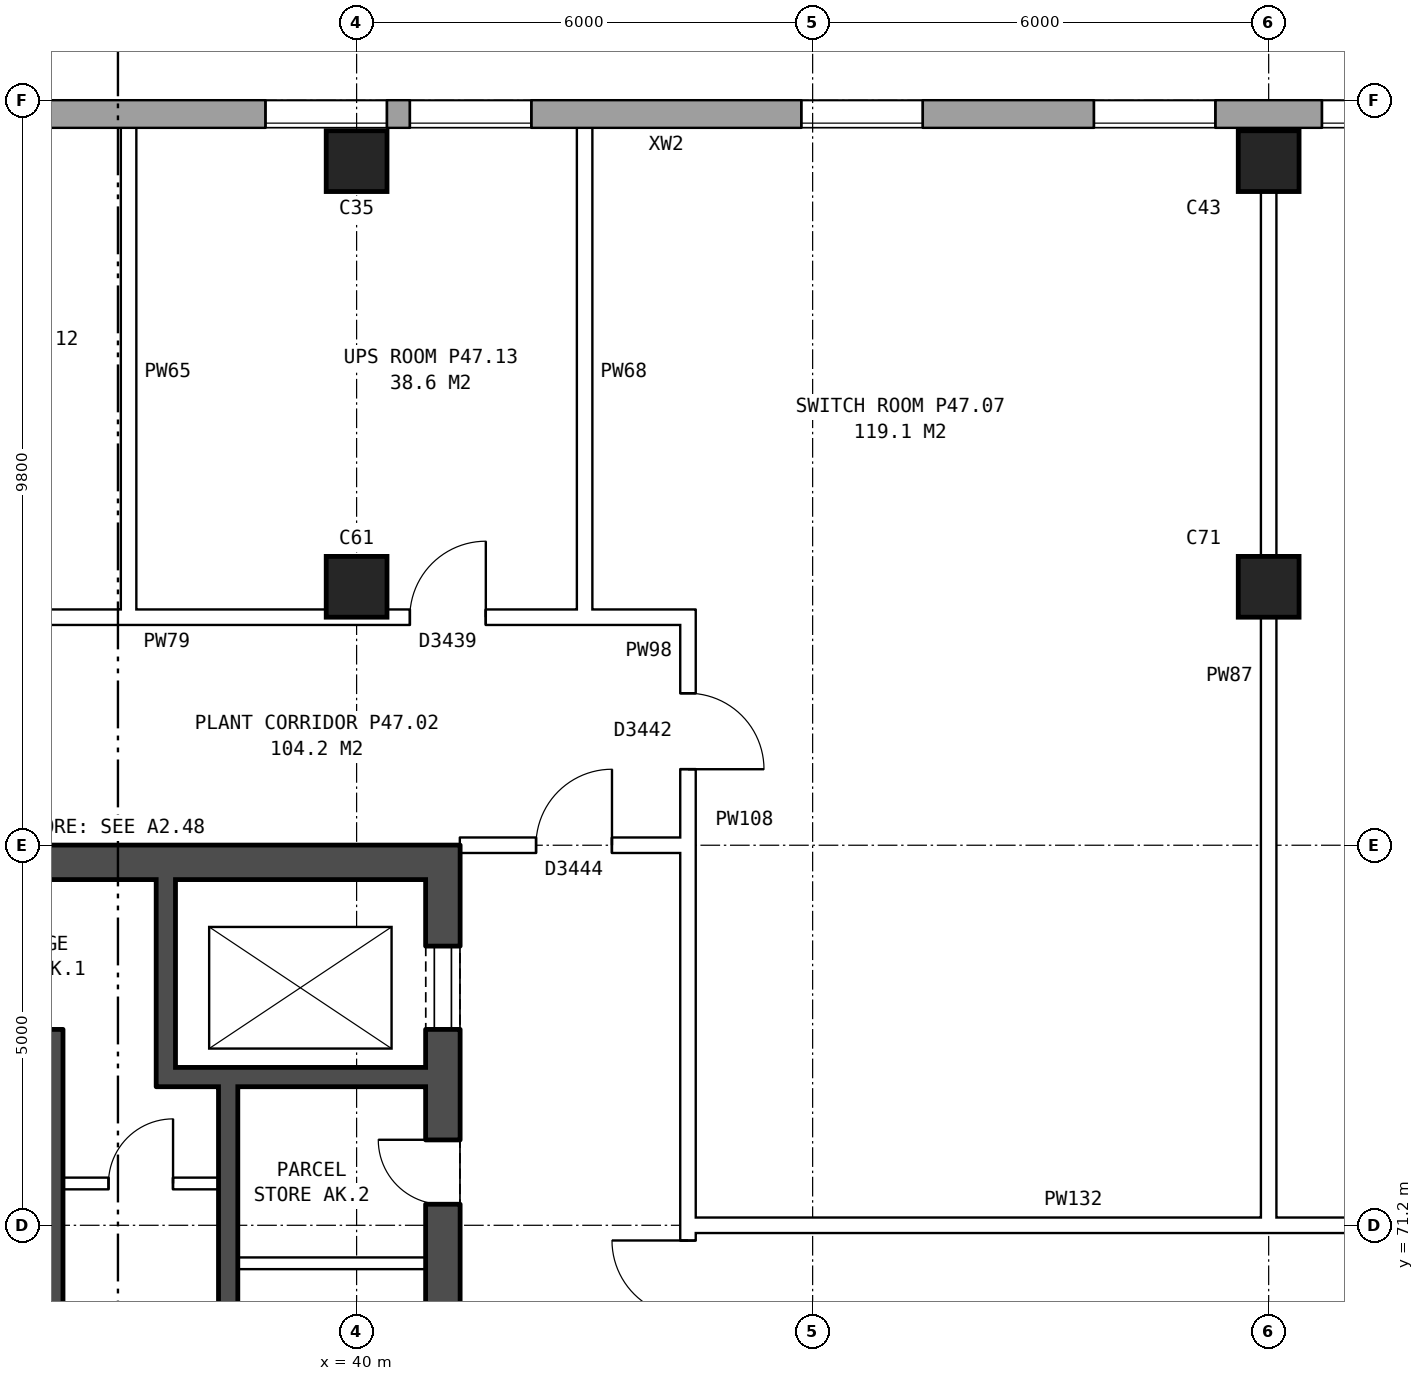
"""IFC4 building model, lengths in metres.
Left out: names, types, materials, properties, quantities, classifications, styles, units other than length and angle.
Written with IfcOpenShell. Run it as: python <this file> out.ifc"""

import sys

from ifc_helpers import new_model, si_unit, direction, frame, frame_2d, origin, origin_2d, place, context, subcontext, project, spatial, rectangle, extrude, element, fill, save


model = new_model("IFC4")
c1 = context("Model", 3, precision=1e-05, world=origin(), true_north=direction((0.0, 1.0)))
c2 = subcontext(c1, "Body", "Model", "MODEL_VIEW")
j1 = project(units=[si_unit("LENGTHUNIT", "METRE"), si_unit("PLANEANGLEUNIT", "RADIAN")], contexts=[c1])
p1 = place(None, origin())
s1 = spatial("IfcSite", under=j1, at=p1, CompositionType="ELEMENT")
p2 = place(p1, origin())
s2 = spatial("IfcBuilding", under=s1, at=p2, CompositionType="ELEMENT")
p3 = place(p2, frame((0.0, 0.0, 167.1)))
s3 = spatial("IfcBuildingStorey", under=s2, at=p3, CompositionType="ELEMENT", Elevation=167.1)
for number, where, z_axis, x_axis in (
    (1, (40.0, 79.6, 0.0), (0.0, 0.0, 1.0), (1.0, 0.0, 0.0)),
    (2, (40.0, 85.2, 0.0), (0.0, 0.0, 1.0), (1.0, 0.0, 0.0)),
    (3, (52.0, 79.6, 0.0), (0.0, 0.0, 1.0), (1.0, 0.0, 0.0)),
    (4, (52.0, 85.2, 0.0), (0.0, 0.0, 1.0), (1.0, 0.0, 0.0)),
):
    element("IfcColumn", number, at=place(p3, frame(where, z_axis=z_axis, x_axis=x_axis)), inside=s3, PredefinedType="COLUMN", context=c2, shape_type="SweptSolid", body=[
        extrude(rectangle(XDim=0.8, YDim=0.8, at=origin_2d()), origin(), (0.0, 0.0, 1.0), 4.2),
    ])
p4 = place(p3, frame((72.925, 85.82, 0.0), z_axis=(0.0, 0.0, 1.0), x_axis=(-1.0, 0.0, 0.0)))
e5 = element("IfcWall", 5, at=p4, inside=s3, PredefinedType="STANDARD", context=c2, shape_type="SweptSolid", body=[
    extrude(rectangle(XDim=39.601, YDim=0.36, at=frame_2d((19.8, 0.0))), origin(), (0.0, 0.0, 1.0), 4.2),
])
p5 = place(p4, frame((2.25, 0.0, 1.5)))
e6 = element("IfcOpeningElement", 6, at=p5, cuts=e5, PredefinedType="OPENING", context=c2, shape_type="SweptSolid", body=[
    extrude(rectangle(XDim=1.6, YDim=1.2, at=frame_2d((0.8, 0.6))), frame((0.0, 0.19, 0.0), z_axis=(0.0, -1.0, 0.0), x_axis=(1.0, 0.0, 0.0)), (0.0, 0.0, 1.0), 0.38),
])
p6 = place(p4, frame((6.625, 0.0, 1.5)))
e7 = element("IfcOpeningElement", 7, at=p6, cuts=e5, PredefinedType="OPENING", context=c2, shape_type="SweptSolid", body=[
    extrude(rectangle(XDim=1.6, YDim=1.2, at=frame_2d((0.8, 0.6))), frame((0.0, 0.19, 0.0), z_axis=(0.0, -1.0, 0.0), x_axis=(1.0, 0.0, 0.0)), (0.0, 0.0, 1.0), 0.38),
])
p7 = place(p4, frame((9.625, 0.0, 1.5)))
e8 = element("IfcOpeningElement", 8, at=p7, cuts=e5, PredefinedType="OPENING", context=c2, shape_type="SweptSolid", body=[
    extrude(rectangle(XDim=1.6, YDim=1.2, at=frame_2d((0.8, 0.6))), frame((0.0, 0.19, 0.0), z_axis=(0.0, -1.0, 0.0), x_axis=(1.0, 0.0, 0.0)), (0.0, 0.0, 1.0), 0.38),
])
p8 = place(p4, frame((13.875, 0.0, 1.5)))
e9 = element("IfcOpeningElement", 9, at=p8, cuts=e5, PredefinedType="OPENING", context=c2, shape_type="SweptSolid", body=[
    extrude(rectangle(XDim=0.6, YDim=1.2, at=frame_2d((0.3, 0.6))), frame((0.0, 0.19, 0.0), z_axis=(0.0, -1.0, 0.0), x_axis=(1.0, 0.0, 0.0)), (0.0, 0.0, 1.0), 0.38),
])
p9 = place(p4, frame((15.125, 0.0, 1.5)))
e10 = element("IfcOpeningElement", 10, at=p9, cuts=e5, PredefinedType="OPENING", context=c2, shape_type="SweptSolid", body=[
    extrude(rectangle(XDim=0.6, YDim=1.2, at=frame_2d((0.3, 0.6))), frame((0.0, 0.19, 0.0), z_axis=(0.0, -1.0, 0.0), x_axis=(1.0, 0.0, 0.0)), (0.0, 0.0, 1.0), 0.38),
])
p10 = place(p4, frame((18.625, 0.0, 1.5)))
e11 = element("IfcOpeningElement", 11, at=p10, cuts=e5, PredefinedType="OPENING", context=c2, shape_type="SweptSolid", body=[
    extrude(rectangle(XDim=1.6, YDim=1.2, at=frame_2d((0.8, 0.6))), frame((0.0, 0.19, 0.0), z_axis=(0.0, -1.0, 0.0), x_axis=(1.0, 0.0, 0.0)), (0.0, 0.0, 1.0), 0.38),
])
p11 = place(p4, frame((21.625, 0.0, 1.5)))
e12 = element("IfcOpeningElement", 12, at=p11, cuts=e5, PredefinedType="OPENING", context=c2, shape_type="SweptSolid", body=[
    extrude(rectangle(XDim=1.6, YDim=1.2, at=frame_2d((0.8, 0.6))), frame((0.0, 0.19, 0.0), z_axis=(0.0, -1.0, 0.0), x_axis=(1.0, 0.0, 0.0)), (0.0, 0.0, 1.0), 0.38),
])
p12 = place(p4, frame((25.475, 0.0, 1.5)))
e13 = element("IfcOpeningElement", 13, at=p12, cuts=e5, PredefinedType="OPENING", context=c2, shape_type="SweptSolid", body=[
    extrude(rectangle(XDim=1.6, YDim=1.2, at=frame_2d((0.8, 0.6))), frame((0.0, 0.19, 0.0), z_axis=(0.0, -1.0, 0.0), x_axis=(1.0, 0.0, 0.0)), (0.0, 0.0, 1.0), 0.38),
])
p13 = place(p4, frame((30.625, 0.0, 1.5)))
e14 = element("IfcOpeningElement", 14, at=p13, cuts=e5, PredefinedType="OPENING", context=c2, shape_type="SweptSolid", body=[
    extrude(rectangle(XDim=1.6, YDim=1.2, at=frame_2d((0.8, 0.6))), frame((0.0, 0.19, 0.0), z_axis=(0.0, -1.0, 0.0), x_axis=(1.0, 0.0, 0.0)), (0.0, 0.0, 1.0), 0.38),
])
p14 = place(p4, frame((32.525, 0.0, 1.5)))
e15 = element("IfcOpeningElement", 15, at=p14, cuts=e5, PredefinedType="OPENING", context=c2, shape_type="SweptSolid", body=[
    extrude(rectangle(XDim=1.6, YDim=1.2, at=frame_2d((0.8, 0.6))), frame((0.0, 0.19, 0.0), z_axis=(0.0, -1.0, 0.0), x_axis=(1.0, 0.0, 0.0)), (0.0, 0.0, 1.0), 0.38),
])
p15 = place(p4, frame((37.075, 0.0, 1.5)))
e16 = element("IfcOpeningElement", 16, at=p15, cuts=e5, PredefinedType="OPENING", context=c2, shape_type="SweptSolid", body=[
    extrude(rectangle(XDim=1.6, YDim=1.2, at=frame_2d((0.8, 0.6))), frame((0.0, 0.19, 0.0), z_axis=(0.0, -1.0, 0.0), x_axis=(1.0, 0.0, 0.0)), (0.0, 0.0, 1.0), 0.38),
])
p16 = place(p3, frame((41.135, 76.2, 0.0), z_axis=(0.0, 0.0, 1.0), x_axis=(0.0, -1.0, 0.0)))
e17 = element("IfcWall", 17, at=p16, inside=s3, PredefinedType="SHEAR", context=c2, shape_type="SweptSolid", body=[
    extrude(rectangle(XDim=12.4, YDim=0.45, at=frame_2d((6.2, 0.0))), origin(), (0.0, 0.0, 1.0), 4.2),
])
p17 = place(p16, frame((1.325, 0.0, 0.0)))
e18 = element("IfcOpeningElement", 18, at=p17, cuts=e17, PredefinedType="OPENING", context=c2, shape_type="SweptSolid", body=[
    extrude(rectangle(XDim=1.1, YDim=2.1, at=frame_2d((0.55, 1.05))), frame((0.0, 0.235, 0.0), z_axis=(0.0, -1.0, 0.0), x_axis=(1.0, 0.0, 0.0)), (0.0, 0.0, 1.0), 0.47),
])
p18 = place(p16, frame((3.875, 0.0, 0.0)))
e19 = element("IfcOpeningElement", 19, at=p18, cuts=e17, PredefinedType="OPENING", context=c2, shape_type="SweptSolid", body=[
    extrude(rectangle(XDim=0.85, YDim=2.1, at=frame_2d((0.425, 1.05))), frame((0.0, 0.235, 0.0), z_axis=(0.0, -1.0, 0.0), x_axis=(1.0, 0.0, 0.0)), (0.0, 0.0, 1.0), 0.47),
])
p19 = place(p16, frame((7.125, 0.0, 0.0)))
e20 = element("IfcOpeningElement", 20, at=p19, cuts=e17, PredefinedType="OPENING", context=c2, shape_type="SweptSolid", body=[
    extrude(rectangle(XDim=0.85, YDim=2.1, at=frame_2d((0.425, 1.05))), frame((0.0, 0.235, 0.0), z_axis=(0.0, -1.0, 0.0), x_axis=(1.0, 0.0, 0.0)), (0.0, 0.0, 1.0), 0.47),
])
p20 = place(p16, frame((9.9, 0.0, 0.0)))
e21 = element("IfcOpeningElement", 21, at=p20, cuts=e17, PredefinedType="OPENING", context=c2, shape_type="SweptSolid", body=[
    extrude(rectangle(XDim=1.1, YDim=2.1, at=frame_2d((0.55, 1.05))), frame((0.0, 0.235, 0.0), z_axis=(0.0, -1.0, 0.0), x_axis=(1.0, 0.0, 0.0)), (0.0, 0.0, 1.0), 0.47),
])
p21 = place(p3, frame((40.91, 75.975, 0.0), z_axis=(0.0, 0.0, 1.0), x_axis=(-1.0, 0.0, 0.0)))
e22 = element("IfcWall", 22, at=p21, inside=s3, PredefinedType="SHEAR", context=c2, shape_type="SweptSolid", body=[
    extrude(rectangle(XDim=8.1, YDim=0.45, at=frame_2d((4.05, 0.0))), origin(), (0.0, 0.0, 1.0), 4.2),
])
p22 = place(p3, frame((40.91, 73.15, 0.0), z_axis=(0.0, 0.0, 1.0), x_axis=(-1.0, 0.0, 0.0)))
e23 = element("IfcWall", 23, at=p22, inside=s3, PredefinedType="SHEAR", context=c2, shape_type="SweptSolid", body=[
    extrude(rectangle(XDim=3.545, YDim=0.25, at=frame_2d((1.772, 0.0))), origin(), (0.0, 0.0, 1.0), 4.2),
])
p23 = place(p3, frame((38.185, 71.75, 0.0), z_axis=(0.0, 0.0, 1.0), x_axis=(-1.0, 0.0, 0.0)))
e24 = element("IfcWall", 24, at=p23, inside=s3, PredefinedType="PARTITIONING", context=c2, shape_type="SweptSolid", body=[
    extrude(rectangle(XDim=2.05, YDim=0.15, at=frame_2d((1.025, 0.0))), origin(), (0.0, 0.0, 1.0), 4.2),
])
p24 = place(p23, frame((0.6, 0.0, 0.0)))
e25 = element("IfcOpeningElement", 25, at=p24, cuts=e24, PredefinedType="OPENING", context=c2, shape_type="SweptSolid", body=[
    extrude(rectangle(XDim=0.85, YDim=2.1, at=frame_2d((0.425, 1.05))), frame((0.0, 0.085, 0.0), z_axis=(0.0, -1.0, 0.0), x_axis=(1.0, 0.0, 0.0)), (0.0, 0.0, 1.0), 0.17),
])
p25 = place(p3, frame((40.91, 70.7, 0.0), z_axis=(0.0, 0.0, 1.0), x_axis=(-1.0, 0.0, 0.0)))
e26 = element("IfcWall", 26, at=p25, inside=s3, PredefinedType="PARTITIONING", context=c2, shape_type="SweptSolid", body=[
    extrude(rectangle(XDim=2.475, YDim=0.15, at=frame_2d((1.237, 0.0))), origin(), (0.0, 0.0, 1.0), 4.2),
])
p26 = place(p3, frame((38.31, 73.025, 0.0), z_axis=(0.0, 0.0, 1.0), x_axis=(0.0, -1.0, 0.0)))
e27 = element("IfcWall", 27, at=p26, inside=s3, PredefinedType="SHEAR", context=c2, shape_type="SweptSolid", body=[
    extrude(rectangle(XDim=6.6, YDim=0.25, at=frame_2d((3.3, 0.0))), origin(), (0.0, 0.0, 1.0), 4.2),
])
p27 = place(p3, frame((37.49, 75.75, 0.0), z_axis=(0.0, 0.0, 1.0), x_axis=(0.0, -1.0, 0.0)))
e28 = element("IfcWall", 28, at=p27, inside=s3, PredefinedType="SHEAR", context=c2, shape_type="SweptSolid", body=[
    extrude(rectangle(XDim=2.475, YDim=0.25, at=frame_2d((1.238, 0.0))), origin(), (0.0, 0.0, 1.0), 4.2),
])
p28 = place(p3, frame((36.01, 73.775, 0.0), z_axis=(0.0, 0.0, 1.0), x_axis=(0.0, -1.0, 0.0)))
e29 = element("IfcWall", 29, at=p28, inside=s3, PredefinedType="SHEAR", context=c2, shape_type="SweptSolid", body=[
    extrude(rectangle(XDim=7.35, YDim=0.25, at=frame_2d((3.675, 0.0))), origin(), (0.0, 0.0, 1.0), 4.2),
])
p29 = place(p3, frame((44.36, 63.9, 0.0), z_axis=(0.0, 0.0, 1.0), x_axis=(0.0, 1.0, 0.0)))
e30 = element("IfcWall", 30, at=p29, inside=s3, PredefinedType="PARTITIONING", context=c2, shape_type="SweptSolid", body=[
    extrude(rectangle(XDim=12.2, YDim=0.2, at=frame_2d((6.1, 0.0))), origin(), (0.0, 0.0, 1.0), 4.2),
])
p30 = place(p29, frame((5.1, 0.0, 0.0)))
e31 = element("IfcOpeningElement", 31, at=p30, cuts=e30, PredefinedType="OPENING", context=c2, shape_type="SweptSolid", body=[
    extrude(rectangle(XDim=2.0, YDim=2.1, at=frame_2d((1.0, 1.05))), frame((0.0, 0.11, 0.0), z_axis=(0.0, -1.0, 0.0), x_axis=(1.0, 0.0, 0.0)), (0.0, 0.0, 1.0), 0.22),
])
p31 = place(p3, frame((44.36, 71.2, 0.0), z_axis=(0.0, 0.0, 1.0), x_axis=(1.0, 0.0, 0.0)))
e32 = element("IfcWall", 32, at=p31, inside=s3, PredefinedType="PARTITIONING", context=c2, shape_type="SweptSolid", body=[
    extrude(rectangle(XDim=19.28, YDim=0.2, at=frame_2d((9.64, 0.0))), origin(), (0.0, 0.0, 1.0), 4.2),
])
p32 = place(p31, frame((10.14, 0.0, 0.0)))
e33 = element("IfcOpeningElement", 33, at=p32, cuts=e32, PredefinedType="OPENING", context=c2, shape_type="SweptSolid", body=[
    extrude(rectangle(XDim=1.0, YDim=2.1, at=frame_2d((0.5, 1.05))), frame((0.0, 0.11, 0.0), z_axis=(0.0, -1.0, 0.0), x_axis=(1.0, 0.0, 0.0)), (0.0, 0.0, 1.0), 0.22),
])
p33 = place(p3, frame((41.36, 76.2, 0.0), z_axis=(0.0, 0.0, 1.0), x_axis=(1.0, 0.0, 0.0)))
e34 = element("IfcWall", 34, at=p33, inside=s3, PredefinedType="PARTITIONING", context=c2, shape_type="SweptSolid", body=[
    extrude(rectangle(XDim=3.1, YDim=0.2, at=frame_2d((1.55, 0.0))), origin(), (0.0, 0.0, 1.0), 4.2),
])
p34 = place(p33, frame((1.0, 0.0, 0.0)))
e35 = element("IfcOpeningElement", 35, at=p34, cuts=e34, PredefinedType="OPENING", context=c2, shape_type="SweptSolid", body=[
    extrude(rectangle(XDim=1.0, YDim=2.1, at=frame_2d((0.5, 1.05))), frame((0.0, 0.11, 0.0), z_axis=(0.0, -1.0, 0.0), x_axis=(1.0, 0.0, 0.0)), (0.0, 0.0, 1.0), 0.22),
])
p35 = place(p3, frame((30.49, 79.2, 0.0), z_axis=(0.0, 0.0, 1.0), x_axis=(1.0, 0.0, 0.0)))
e36 = element("IfcWall", 36, at=p35, inside=s3, PredefinedType="PARTITIONING", context=c2, shape_type="SweptSolid", body=[
    extrude(rectangle(XDim=13.97, YDim=0.2, at=frame_2d((6.985, 0.0))), origin(), (0.0, 0.0, 1.0), 4.2),
])
p36 = place(p35, frame((2.815, 0.0, 0.0)))
e37 = element("IfcOpeningElement", 37, at=p36, cuts=e36, PredefinedType="OPENING", context=c2, shape_type="SweptSolid", body=[
    extrude(rectangle(XDim=1.0, YDim=2.1, at=frame_2d((0.5, 1.05))), frame((0.0, 0.11, 0.0), z_axis=(0.0, -1.0, 0.0), x_axis=(1.0, 0.0, 0.0)), (0.0, 0.0, 1.0), 0.22),
])
p37 = place(p35, frame((10.21, 0.0, 0.0)))
e38 = element("IfcOpeningElement", 38, at=p37, cuts=e36, PredefinedType="OPENING", context=c2, shape_type="SweptSolid", body=[
    extrude(rectangle(XDim=1.0, YDim=2.1, at=frame_2d((0.5, 1.05))), frame((0.0, 0.11, 0.0), z_axis=(0.0, -1.0, 0.0), x_axis=(1.0, 0.0, 0.0)), (0.0, 0.0, 1.0), 0.22),
])
for number, where, z_axis, x_axis in (
    (39, (37.0, 79.1, 0.0), (0.0, 0.0, 1.0), (0.0, 1.0, 0.0)),
    (40, (43.0, 79.1, 0.0), (0.0, 0.0, 1.0), (0.0, 1.0, 0.0)),
):
    element("IfcWall", number, at=place(p3, frame(where, z_axis=z_axis, x_axis=x_axis)), inside=s3, PredefinedType="PARTITIONING", context=c2, shape_type="SweptSolid", body=[
        extrude(rectangle(XDim=6.66, YDim=0.2, at=frame_2d((3.33, 0.0))), origin(), (0.0, 0.0, 1.0), 4.2),
    ])
p38 = place(p3, frame((44.36, 76.1, 0.0), z_axis=(0.0, 0.0, 1.0), x_axis=(0.0, 1.0, 0.0)))
e41 = element("IfcWall", 41, at=p38, inside=s3, PredefinedType="PARTITIONING", context=c2, shape_type="SweptSolid", body=[
    extrude(rectangle(XDim=3.2, YDim=0.2, at=frame_2d((1.6, 0.0))), origin(), (0.0, 0.0, 1.0), 4.2),
])
p39 = place(p38, frame((1.1, 0.0, 0.0)))
e42 = element("IfcOpeningElement", 42, at=p39, cuts=e41, PredefinedType="OPENING", context=c2, shape_type="SweptSolid", body=[
    extrude(rectangle(XDim=1.0, YDim=2.1, at=frame_2d((0.5, 1.05))), frame((0.0, 0.11, 0.0), z_axis=(0.0, -1.0, 0.0), x_axis=(1.0, 0.0, 0.0)), (0.0, 0.0, 1.0), 0.22),
])
p40 = place(p3, frame((52.0, 71.1, 0.0), z_axis=(0.0, 0.0, 1.0), x_axis=(0.0, 1.0, 0.0)))
e43 = element("IfcWall", 43, at=p40, inside=s3, PredefinedType="PARTITIONING", context=c2, shape_type="SweptSolid", body=[
    extrude(rectangle(XDim=14.66, YDim=0.2, at=frame_2d((7.33, 0.0))), origin(), (0.0, 0.0, 1.0), 4.2),
])
p41 = place(p10, origin())
e44 = element("IfcWindow", 44, at=p41, inside=s3, PartitioningType="DOUBLE_PANEL_HORIZONTAL", PredefinedType="WINDOW", context=c2, shape_type="SweptSolid", body=[
    extrude(rectangle(XDim=1.6, YDim=1.2, at=frame_2d((0.8, 0.6))), frame((0.0, 0.15, 0.0), z_axis=(0.0, -1.0, 0.0), x_axis=(1.0, 0.0, 0.0)), (0.0, 0.0, 1.0), 0.06),
])
fill(e11, e44)
p42 = place(p11, origin())
e45 = element("IfcWindow", 45, at=p42, inside=s3, PartitioningType="DOUBLE_PANEL_HORIZONTAL", PredefinedType="WINDOW", context=c2, shape_type="SweptSolid", body=[
    extrude(rectangle(XDim=1.6, YDim=1.2, at=frame_2d((0.8, 0.6))), frame((0.0, 0.15, 0.0), z_axis=(0.0, -1.0, 0.0), x_axis=(1.0, 0.0, 0.0)), (0.0, 0.0, 1.0), 0.06),
])
fill(e12, e45)
p43 = place(p12, origin())
e46 = element("IfcWindow", 46, at=p43, inside=s3, PartitioningType="DOUBLE_PANEL_HORIZONTAL", PredefinedType="WINDOW", context=c2, shape_type="SweptSolid", body=[
    extrude(rectangle(XDim=1.6, YDim=1.2, at=frame_2d((0.8, 0.6))), frame((0.0, 0.15, 0.0), z_axis=(0.0, -1.0, 0.0), x_axis=(1.0, 0.0, 0.0)), (0.0, 0.0, 1.0), 0.06),
])
fill(e13, e46)
p44 = place(p13, origin())
e47 = element("IfcWindow", 47, at=p44, inside=s3, PartitioningType="DOUBLE_PANEL_HORIZONTAL", PredefinedType="WINDOW", context=c2, shape_type="SweptSolid", body=[
    extrude(rectangle(XDim=1.6, YDim=1.2, at=frame_2d((0.8, 0.6))), frame((0.0, 0.15, 0.0), z_axis=(0.0, -1.0, 0.0), x_axis=(1.0, 0.0, 0.0)), (0.0, 0.0, 1.0), 0.06),
])
fill(e14, e47)
p45 = place(p14, origin())
e48 = element("IfcWindow", 48, at=p45, inside=s3, PartitioningType="DOUBLE_PANEL_HORIZONTAL", PredefinedType="WINDOW", context=c2, shape_type="SweptSolid", body=[
    extrude(rectangle(XDim=1.6, YDim=1.2, at=frame_2d((0.8, 0.6))), frame((0.0, 0.15, 0.0), z_axis=(0.0, -1.0, 0.0), x_axis=(1.0, 0.0, 0.0)), (0.0, 0.0, 1.0), 0.06),
])
fill(e15, e48)
p46 = place(p17, origin())
e49 = element("IfcDoor", 49, at=p46, inside=s3, OperationType="DOUBLE_DOOR_SLIDING", PredefinedType="DOOR", context=c2, shape_type="SweptSolid", body=[
    extrude(rectangle(XDim=1.1, YDim=2.1, at=frame_2d((0.55, 1.05))), frame((0.0, -0.16, 0.0), z_axis=(0.0, -1.0, 0.0), x_axis=(1.0, 0.0, 0.0)), (0.0, 0.0, 1.0), 0.05),
])
fill(e18, e49)
p47 = place(p18, frame((0.85, 0.0, 0.0), z_axis=(0.0, 0.0, 1.0), x_axis=(-1.0, 0.0, 0.0)))
e50 = element("IfcDoor", 50, at=p47, inside=s3, OperationType="SINGLE_SWING_RIGHT", PredefinedType="DOOR", context=c2, shape_type="SweptSolid", body=[
    extrude(rectangle(XDim=0.85, YDim=2.1, at=frame_2d((0.425, 1.05))), frame((0.0, 0.21, 0.0), z_axis=(0.0, -1.0, 0.0), x_axis=(1.0, 0.0, 0.0)), (0.0, 0.0, 1.0), 0.05),
])
fill(e19, e50)
p48 = place(p24, frame((0.85, 0.0, 0.0), z_axis=(0.0, 0.0, 1.0), x_axis=(-1.0, 0.0, 0.0)))
e51 = element("IfcDoor", 51, at=p48, inside=s3, OperationType="SINGLE_SWING_RIGHT", PredefinedType="DOOR", context=c2, shape_type="SweptSolid", body=[
    extrude(rectangle(XDim=0.85, YDim=2.1, at=frame_2d((0.425, 1.05))), frame((0.0, 0.025, 0.0), z_axis=(0.0, -1.0, 0.0), x_axis=(1.0, 0.0, 0.0)), (0.0, 0.0, 1.0), 0.05),
])
fill(e25, e51)
p49 = place(p30, origin())
e52 = element("IfcDoor", 52, at=p49, inside=s3, OperationType="DOUBLE_DOOR_SINGLE_SWING", PredefinedType="DOOR", context=c2, shape_type="SweptSolid", body=[
    extrude(rectangle(XDim=2.0, YDim=2.1, at=frame_2d((1.0, 1.05))), frame((0.0, 0.025, 0.0), z_axis=(0.0, -1.0, 0.0), x_axis=(1.0, 0.0, 0.0)), (0.0, 0.0, 1.0), 0.05),
])
fill(e31, e52)
p50 = place(p34, origin())
e53 = element("IfcDoor", 53, at=p50, inside=s3, OperationType="SINGLE_SWING_RIGHT", PredefinedType="DOOR", context=c2, shape_type="SweptSolid", body=[
    extrude(rectangle(XDim=1.0, YDim=2.1, at=frame_2d((0.5, 1.05))), frame((0.0, 0.025, 0.0), z_axis=(0.0, -1.0, 0.0), x_axis=(1.0, 0.0, 0.0)), (0.0, 0.0, 1.0), 0.05),
])
fill(e35, e53)
p51 = place(p37, origin())
e54 = element("IfcDoor", 54, at=p51, inside=s3, OperationType="SINGLE_SWING_RIGHT", PredefinedType="DOOR", context=c2, shape_type="SweptSolid", body=[
    extrude(rectangle(XDim=1.0, YDim=2.1, at=frame_2d((0.5, 1.05))), frame((0.0, 0.025, 0.0), z_axis=(0.0, -1.0, 0.0), x_axis=(1.0, 0.0, 0.0)), (0.0, 0.0, 1.0), 0.05),
])
fill(e38, e54)
p52 = place(p39, frame((1.0, 0.0, 0.0), z_axis=(0.0, 0.0, 1.0), x_axis=(-1.0, 0.0, 0.0)))
e55 = element("IfcDoor", 55, at=p52, inside=s3, OperationType="SINGLE_SWING_RIGHT", PredefinedType="DOOR", context=c2, shape_type="SweptSolid", body=[
    extrude(rectangle(XDim=1.0, YDim=2.1, at=frame_2d((0.5, 1.05))), frame((0.0, 0.025, 0.0), z_axis=(0.0, -1.0, 0.0), x_axis=(1.0, 0.0, 0.0)), (0.0, 0.0, 1.0), 0.05),
])
fill(e42, e55)
save(model, sys.argv[1])
